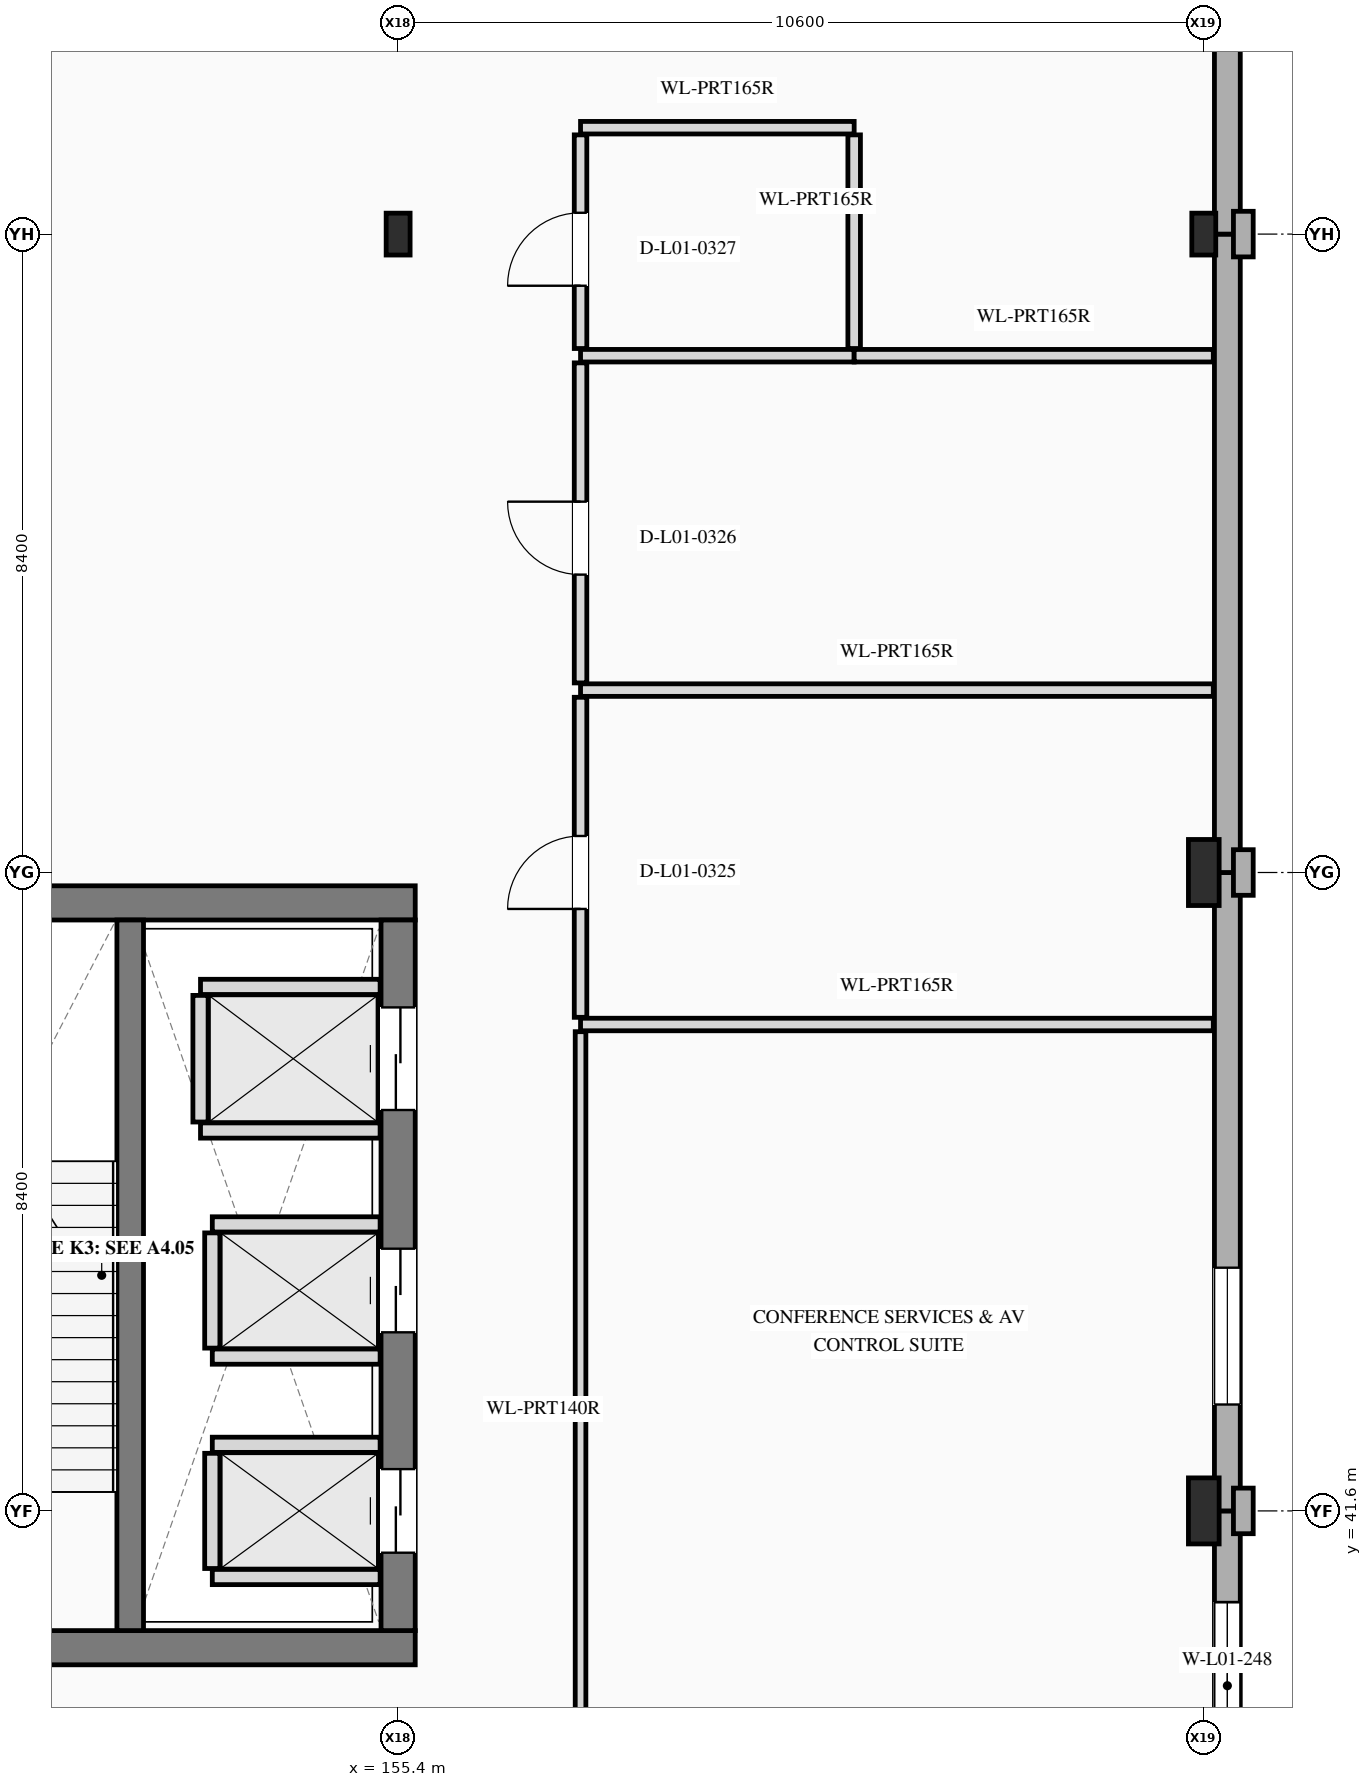
"""IFC4 building model, lengths in metres.
Left out: names, types, materials, properties, quantities, classifications, styles, units other than length and angle.
Written with IfcOpenShell. Run it as: python <this file> out.ifc"""

import sys

from ifc_helpers import new_model, si_unit, direction, frame, frame_2d, origin, origin_2d, place, context, subcontext, project, spatial, rectangle, i_section, extrude, element, fill, save


model = new_model("IFC4")
c1 = context("Model", 3, precision=1e-05, world=origin(), true_north=direction((0.0, 1.0)))
c2 = subcontext(c1, "Body", "Model", "MODEL_VIEW")
j1 = project(units=[si_unit("LENGTHUNIT", "METRE"), si_unit("PLANEANGLEUNIT", "RADIAN")], contexts=[c1])
p1 = place(None, origin())
s1 = spatial("IfcSite", under=j1, at=p1, CompositionType="ELEMENT")
p2 = place(p1, origin())
s2 = spatial("IfcBuilding", under=s1, at=p2, CompositionType="ELEMENT")
p3 = place(p2, frame((0.0, 0.0, 5.4)))
s3 = spatial("IfcBuildingStorey", under=s2, at=p3, CompositionType="ELEMENT", Elevation=5.4)
p4 = place(p3, frame((155.4, 58.4, 0.0), z_axis=(0.0, 0.0, 1.0), x_axis=(1.0, 0.0, 0.0)))
e1 = element("IfcColumn", 1, at=p4, inside=s3, PredefinedType="COLUMN", context=c2, shape_type="SweptSolid", body=[
    extrude(i_section(OverallWidth=0.315, OverallDepth=0.551, WebThickness=0.015, FlangeThickness=0.024, at=origin_2d()), origin(), (0.0, 0.0, 1.0), 5.4),
])
for number, where, z_axis, x_axis in (
    (2, (166.0, 41.6, 0.0), (0.0, 0.0, 1.0), (1.0, 0.0, 0.0)),
    (3, (166.0, 50.0, 0.0), (0.0, 0.0, 1.0), (1.0, 0.0, 0.0)),
):
    element("IfcColumn", number, at=place(p3, frame(where, z_axis=z_axis, x_axis=x_axis)), inside=s3, PredefinedType="COLUMN", context=c2, shape_type="SweptSolid", body=[
        extrude(i_section(OverallWidth=0.404, OverallDepth=0.869, WebThickness=0.021, FlangeThickness=0.036, at=origin_2d()), origin(), (0.0, 0.0, 1.0), 5.4),
    ])
p5 = place(p3, frame((166.0, 58.4, 0.0), z_axis=(0.0, 0.0, 1.0), x_axis=(1.0, 0.0, 0.0)))
e4 = element("IfcColumn", 4, at=p5, inside=s3, PredefinedType="COLUMN", context=c2, shape_type="SweptSolid", body=[
    extrude(i_section(OverallWidth=0.315, OverallDepth=0.551, WebThickness=0.015, FlangeThickness=0.024, at=origin_2d()), origin(), (0.0, 0.0, 1.0), 5.4),
])
p6 = place(p3, frame((166.31, 33.2, 0.0), z_axis=(0.0, 0.0, 1.0), x_axis=(0.0, 1.0, 0.0)))
e5 = element("IfcWall", 5, at=p6, inside=s3, PredefinedType="STANDARD", context=c2, shape_type="SweptSolid", body=[
    extrude(rectangle(XDim=8.4, YDim=0.34, at=frame_2d((4.2, 0.0))), origin(), (0.0, 0.0, 1.0), 5.4),
])
p7 = place(p6, frame((1.2, 0.0, 0.85)))
e6 = element("IfcOpeningElement", 6, at=p7, cuts=e5, PredefinedType="OPENING", context=c2, shape_type="SweptSolid", body=[
    extrude(rectangle(XDim=2.2, YDim=2.1, at=frame_2d((1.1, 1.05))), frame((0.0, 0.18, 0.0), z_axis=(0.0, -1.0, 0.0), x_axis=(1.0, 0.0, 0.0)), (0.0, 0.0, 1.0), 0.36),
])
p8 = place(p6, frame((5.0, 0.0, 0.85)))
e7 = element("IfcOpeningElement", 7, at=p8, cuts=e5, PredefinedType="OPENING", context=c2, shape_type="SweptSolid", body=[
    extrude(rectangle(XDim=2.2, YDim=2.8, at=frame_2d((1.1, 1.4))), frame((0.0, 0.18, 0.0), z_axis=(0.0, -1.0, 0.0), x_axis=(1.0, 0.0, 0.0)), (0.0, 0.0, 1.0), 0.36),
])
p9 = place(p3, frame((166.31, 41.6, 0.0), z_axis=(0.0, 0.0, 1.0), x_axis=(0.0, 1.0, 0.0)))
e8 = element("IfcWall", 8, at=p9, inside=s3, PredefinedType="STANDARD", context=c2, shape_type="SweptSolid", body=[
    extrude(rectangle(XDim=8.4, YDim=0.34, at=frame_2d((4.2, 0.0))), origin(), (0.0, 0.0, 1.0), 5.4),
])
p10 = place(p9, frame((1.4, 0.0, 0.9)))
e9 = element("IfcOpeningElement", 9, at=p10, cuts=e8, PredefinedType="OPENING", context=c2, shape_type="SweptSolid", body=[
    extrude(rectangle(XDim=1.8, YDim=1.8, at=frame_2d((0.9, 0.9))), frame((0.0, 0.18, 0.0), z_axis=(0.0, -1.0, 0.0), x_axis=(1.0, 0.0, 0.0)), (0.0, 0.0, 1.0), 0.36),
])
p11 = place(p3, frame((166.52, 41.3, 0.0), z_axis=(0.0, 0.0, 1.0), x_axis=(0.0, 1.0, 0.0)))
e10 = element("IfcWall", 10, at=p11, inside=s3, PredefinedType="ELEMENTEDWALL", context=c2, shape_type="SweptSolid", body=[
    extrude(rectangle(XDim=0.6, YDim=0.26, at=frame_2d((0.3, 0.0))), origin(), (0.0, 0.0, 1.0), 5.4),
])
p12 = place(p3, frame((166.31, 50.0, 0.0), z_axis=(0.0, 0.0, 1.0), x_axis=(0.0, 1.0, 0.0)))
e11 = element("IfcWall", 11, at=p12, inside=s3, PredefinedType="STANDARD", context=c2, shape_type="SweptSolid", body=[
    extrude(rectangle(XDim=8.4, YDim=0.34, at=frame_2d((4.2, 0.0))), origin(), (0.0, 0.0, 1.0), 5.4),
])
p13 = place(p3, frame((166.52, 49.7, 0.0), z_axis=(0.0, 0.0, 1.0), x_axis=(0.0, 1.0, 0.0)))
e12 = element("IfcWall", 12, at=p13, inside=s3, PredefinedType="ELEMENTEDWALL", context=c2, shape_type="SweptSolid", body=[
    extrude(rectangle(XDim=0.6, YDim=0.26, at=frame_2d((0.3, 0.0))), origin(), (0.0, 0.0, 1.0), 5.4),
])
p14 = place(p3, frame((166.31, 58.4, 0.0), z_axis=(0.0, 0.0, 1.0), x_axis=(0.0, 1.0, 0.0)))
e13 = element("IfcWall", 13, at=p14, inside=s3, PredefinedType="STANDARD", context=c2, shape_type="SweptSolid", body=[
    extrude(rectangle(XDim=8.71, YDim=0.34, at=frame_2d((4.355, 0.0))), origin(), (0.0, 0.0, 1.0), 5.4),
])
p15 = place(p3, frame((166.52, 58.1, 0.0), z_axis=(0.0, 0.0, 1.0), x_axis=(0.0, 1.0, 0.0)))
e14 = element("IfcWall", 14, at=p15, inside=s3, PredefinedType="ELEMENTEDWALL", context=c2, shape_type="SweptSolid", body=[
    extrude(rectangle(XDim=0.6, YDim=0.26, at=frame_2d((0.3, 0.0))), origin(), (0.0, 0.0, 1.0), 5.4),
])
p16 = place(p3, frame((147.375, 39.8, 0.0), z_axis=(0.0, 0.0, 1.0), x_axis=(1.0, 0.0, 0.0)))
e15 = element("IfcWall", 15, at=p16, inside=s3, PredefinedType="SHEAR", context=c2, shape_type="SweptSolid", body=[
    extrude(rectangle(XDim=8.25, YDim=0.45, at=frame_2d((4.125, 0.0))), origin(), (0.0, 0.0, 1.0), 5.4),
])
p17 = place(p16, frame((1.725, 0.0, 0.0)))
e16 = element("IfcOpeningElement", 16, at=p17, cuts=e15, PredefinedType="OPENING", context=c2, shape_type="SweptSolid", body=[
    extrude(rectangle(XDim=0.95, YDim=2.2, at=frame_2d((0.475, 1.1))), frame((0.0, 0.235, 0.0), z_axis=(0.0, -1.0, 0.0), x_axis=(1.0, 0.0, 0.0)), (0.0, 0.0, 1.0), 0.47),
])
p18 = place(p3, frame((155.625, 49.6, 0.0), z_axis=(0.0, 0.0, 1.0), x_axis=(-1.0, 0.0, 0.0)))
e17 = element("IfcWall", 17, at=p18, inside=s3, PredefinedType="SHEAR", context=c2, shape_type="SweptSolid", body=[
    extrude(rectangle(XDim=8.25, YDim=0.45, at=frame_2d((4.125, 0.0))), origin(), (0.0, 0.0, 1.0), 5.4),
])
p19 = place(p3, frame((155.4, 40.025, 0.0), z_axis=(0.0, 0.0, 1.0), x_axis=(0.0, 1.0, 0.0)))
e18 = element("IfcWall", 18, at=p19, inside=s3, PredefinedType="SHEAR", context=c2, shape_type="SweptSolid", body=[
    extrude(rectangle(XDim=9.35, YDim=0.45, at=frame_2d((4.675, 0.0))), origin(), (0.0, 0.0, 1.0), 5.4),
])
p20 = place(p19, frame((1.025, 0.0, 0.0)))
e19 = element("IfcOpeningElement", 19, at=p20, cuts=e18, PredefinedType="OPENING", context=c2, shape_type="SweptSolid", body=[
    extrude(rectangle(XDim=1.1, YDim=2.2, at=frame_2d((0.55, 1.1))), frame((0.0, 0.235, 0.0), z_axis=(0.0, -1.0, 0.0), x_axis=(1.0, 0.0, 0.0)), (0.0, 0.0, 1.0), 0.47),
])
p21 = place(p19, frame((3.925, 0.0, 0.0)))
e20 = element("IfcOpeningElement", 20, at=p21, cuts=e18, PredefinedType="OPENING", context=c2, shape_type="SweptSolid", body=[
    extrude(rectangle(XDim=1.1, YDim=2.2, at=frame_2d((0.55, 1.1))), frame((0.0, 0.235, 0.0), z_axis=(0.0, -1.0, 0.0), x_axis=(1.0, 0.0, 0.0)), (0.0, 0.0, 1.0), 0.47),
])
p22 = place(p19, frame((6.85, 0.0, 0.0)))
e21 = element("IfcOpeningElement", 21, at=p22, cuts=e18, PredefinedType="OPENING", context=c2, shape_type="SweptSolid", body=[
    extrude(rectangle(XDim=1.35, YDim=2.3, at=frame_2d((0.675, 1.15))), frame((0.0, 0.235, 0.0), z_axis=(0.0, -1.0, 0.0), x_axis=(1.0, 0.0, 0.0)), (0.0, 0.0, 1.0), 0.47),
])
p23 = place(p3, frame((151.875, 40.025, 0.0), z_axis=(0.0, 0.0, 1.0), x_axis=(0.0, 1.0, 0.0)))
e22 = element("IfcWall", 22, at=p23, inside=s3, PredefinedType="SHEAR", context=c2, shape_type="SweptSolid", body=[
    extrude(rectangle(XDim=9.35, YDim=0.35, at=frame_2d((4.675, 0.0))), origin(), (0.0, 0.0, 1.0), 5.4),
])
for number, where, z_axis, x_axis in (
    (23, (152.955, 40.73, 0.0), (0.0, 0.0, 1.0), (1.0, 0.0, 0.0)),
    (24, (152.955, 42.47, 0.0), (0.0, 0.0, 1.0), (1.0, 0.0, 0.0)),
):
    element("IfcWall", number, at=place(p3, frame(where, z_axis=z_axis, x_axis=x_axis)), inside=s3, PredefinedType="PLUMBINGWALL", context=c2, shape_type="SweptSolid", body=[
        extrude(rectangle(XDim=2.208, YDim=0.2, at=frame_2d((1.104, 0.0))), origin(), (0.0, 0.0, 1.0), 5.095),
    ])
p24 = place(p3, frame((152.955, 40.842, 0.0), z_axis=(0.0, 0.0, 1.0), x_axis=(0.0, 1.0, 0.0)))
e25 = element("IfcWall", 25, at=p24, inside=s3, PredefinedType="PLUMBINGWALL", context=c2, shape_type="SweptSolid", body=[
    extrude(rectangle(XDim=1.516, YDim=0.2, at=frame_2d((0.758, 0.0))), origin(), (0.0, 0.0, 1.0), 5.095),
])
for number, where, z_axis, x_axis in (
    (26, (152.955, 43.63, 0.0), (0.0, 0.0, 1.0), (1.0, 0.0, 0.0)),
    (27, (152.955, 45.37, 0.0), (0.0, 0.0, 1.0), (1.0, 0.0, 0.0)),
):
    element("IfcWall", number, at=place(p3, frame(where, z_axis=z_axis, x_axis=x_axis)), inside=s3, PredefinedType="PLUMBINGWALL", context=c2, shape_type="SweptSolid", body=[
        extrude(rectangle(XDim=2.208, YDim=0.2, at=frame_2d((1.104, 0.0))), origin(), (0.0, 0.0, 1.0), 5.095),
    ])
p25 = place(p3, frame((152.955, 43.742, 0.0), z_axis=(0.0, 0.0, 1.0), x_axis=(0.0, 1.0, 0.0)))
e28 = element("IfcWall", 28, at=p25, inside=s3, PredefinedType="PLUMBINGWALL", context=c2, shape_type="SweptSolid", body=[
    extrude(rectangle(XDim=1.516, YDim=0.2, at=frame_2d((0.758, 0.0))), origin(), (0.0, 0.0, 1.0), 5.095),
])
for number, where, z_axis, x_axis in (
    (29, (152.8, 46.605, 0.0), (0.0, 0.0, 1.0), (1.0, 0.0, 0.0)),
    (30, (152.8, 48.495, 0.0), (0.0, 0.0, 1.0), (1.0, 0.0, 0.0)),
):
    element("IfcWall", number, at=place(p3, frame(where, z_axis=z_axis, x_axis=x_axis)), inside=s3, PredefinedType="PLUMBINGWALL", context=c2, shape_type="SweptSolid", body=[
        extrude(rectangle(XDim=2.363, YDim=0.2, at=frame_2d((1.182, 0.0))), origin(), (0.0, 0.0, 1.0), 5.095),
    ])
p26 = place(p3, frame((152.8, 46.717, 0.0), z_axis=(0.0, 0.0, 1.0), x_axis=(0.0, 1.0, 0.0)))
e31 = element("IfcWall", 31, at=p26, inside=s3, PredefinedType="PLUMBINGWALL", context=c2, shape_type="SweptSolid", body=[
    extrude(rectangle(XDim=1.666, YDim=0.2, at=frame_2d((0.833, 0.0))), origin(), (0.0, 0.0, 1.0), 5.095),
])
for number, where, z_axis, x_axis in (
    (32, (157.8, 48.0, 0.0), (0.0, 0.0, 1.0), (1.0, 0.0, 0.0)),
    (33, (157.8, 52.4, 0.0), (0.0, 0.0, 1.0), (1.0, 0.0, 0.0)),
):
    element("IfcWall", number, at=place(p3, frame(where, z_axis=z_axis, x_axis=x_axis)), inside=s3, PredefinedType="PARTITIONING", context=c2, shape_type="SweptSolid", body=[
        extrude(rectangle(XDim=8.325, YDim=0.165, at=frame_2d((4.163, 0.0))), origin(), (0.0, 0.0, 1.0), 4.485),
    ])
p27 = place(p3, frame((157.8, 56.8, 0.0), z_axis=(0.0, 0.0, 1.0), x_axis=(1.0, 0.0, 0.0)))
e34 = element("IfcWall", 34, at=p27, inside=s3, PredefinedType="PARTITIONING", context=c2, shape_type="SweptSolid", body=[
    extrude(rectangle(XDim=3.6, YDim=0.165, at=frame_2d((1.8, 0.0))), origin(), (0.0, 0.0, 1.0), 5.095),
])
p28 = place(p3, frame((161.4, 56.8, 0.0), z_axis=(0.0, 0.0, 1.0), x_axis=(1.0, 0.0, 0.0)))
e35 = element("IfcWall", 35, at=p28, inside=s3, PredefinedType="PARTITIONING", context=c2, shape_type="SweptSolid", body=[
    extrude(rectangle(XDim=4.725, YDim=0.165, at=frame_2d((2.363, 0.0))), origin(), (0.0, 0.0, 1.0), 4.485),
])
p29 = place(p3, frame((157.8, 59.8, 0.0), z_axis=(0.0, 0.0, 1.0), x_axis=(1.0, 0.0, 0.0)))
e36 = element("IfcWall", 36, at=p29, inside=s3, PredefinedType="PARTITIONING", context=c2, shape_type="SweptSolid", body=[
    extrude(rectangle(XDim=3.6, YDim=0.165, at=frame_2d((1.8, 0.0))), origin(), (0.0, 0.0, 1.0), 5.095),
])
p30 = place(p3, frame((157.8, 19.082, 0.0), z_axis=(0.0, 0.0, 1.0), x_axis=(0.0, 1.0, 0.0)))
e37 = element("IfcWall", 37, at=p30, inside=s3, PredefinedType="PARTITIONING", context=c2, shape_type="SweptSolid", body=[
    extrude(rectangle(XDim=28.823, YDim=0.14, at=frame_2d((14.412, 0.0))), origin(), (0.0, 0.0, 1.0), 4.508),
])
p31 = place(p30, frame((10.118, 0.0, 0.0)))
e38 = element("IfcOpeningElement", 38, at=p31, cuts=e37, PredefinedType="OPENING", context=c2, shape_type="SweptSolid", body=[
    extrude(rectangle(XDim=1.6, YDim=2.4, at=frame_2d((0.8, 1.2))), frame((0.0, 0.08, 0.0), z_axis=(0.0, -1.0, 0.0), x_axis=(1.0, 0.0, 0.0)), (0.0, 0.0, 1.0), 0.16),
])
p32 = place(p3, frame((157.8, 48.094, 0.0), z_axis=(0.0, 0.0, 1.0), x_axis=(0.0, 1.0, 0.0)))
e39 = element("IfcWall", 39, at=p32, inside=s3, PredefinedType="PARTITIONING", context=c2, shape_type="SweptSolid", body=[
    extrude(rectangle(XDim=4.211, YDim=0.165, at=frame_2d((2.105, 0.0))), origin(), (0.0, 0.0, 1.0), 5.095),
])
p33 = place(p32, frame((1.426, 0.0, 0.0)))
e40 = element("IfcOpeningElement", 40, at=p33, cuts=e39, PredefinedType="OPENING", context=c2, shape_type="SweptSolid", body=[
    extrude(rectangle(XDim=0.96, YDim=2.15, at=frame_2d((0.48, 1.075))), frame((0.0, 0.093, 0.0), z_axis=(0.0, -1.0, 0.0), x_axis=(1.0, 0.0, 0.0)), (0.0, 0.0, 1.0), 0.185),
])
p34 = place(p3, frame((157.8, 52.494, 0.0), z_axis=(0.0, 0.0, 1.0), x_axis=(0.0, 1.0, 0.0)))
e41 = element("IfcWall", 41, at=p34, inside=s3, PredefinedType="PARTITIONING", context=c2, shape_type="SweptSolid", body=[
    extrude(rectangle(XDim=4.211, YDim=0.165, at=frame_2d((2.105, 0.0))), origin(), (0.0, 0.0, 1.0), 5.095),
])
p35 = place(p34, frame((1.425, 0.0, 0.0)))
e42 = element("IfcOpeningElement", 42, at=p35, cuts=e41, PredefinedType="OPENING", context=c2, shape_type="SweptSolid", body=[
    extrude(rectangle(XDim=0.96, YDim=2.15, at=frame_2d((0.48, 1.075))), frame((0.0, 0.093, 0.0), z_axis=(0.0, -1.0, 0.0), x_axis=(1.0, 0.0, 0.0)), (0.0, 0.0, 1.0), 0.185),
])
p36 = place(p3, frame((157.8, 56.895, 0.0), z_axis=(0.0, 0.0, 1.0), x_axis=(0.0, 1.0, 0.0)))
e43 = element("IfcWall", 43, at=p36, inside=s3, PredefinedType="PARTITIONING", context=c2, shape_type="SweptSolid", body=[
    extrude(rectangle(XDim=2.811, YDim=0.165, at=frame_2d((1.406, 0.0))), origin(), (0.0, 0.0, 1.0), 4.508),
])
p37 = place(p36, frame((0.826, 0.0, 0.0)))
e44 = element("IfcOpeningElement", 44, at=p37, cuts=e43, PredefinedType="OPENING", context=c2, shape_type="SweptSolid", body=[
    extrude(rectangle(XDim=0.96, YDim=2.15, at=frame_2d((0.48, 1.075))), frame((0.0, 0.093, 0.0), z_axis=(0.0, -1.0, 0.0), x_axis=(1.0, 0.0, 0.0)), (0.0, 0.0, 1.0), 0.185),
])
p38 = place(p3, frame((161.4, 56.895, 0.0), z_axis=(0.0, 0.0, 1.0), x_axis=(0.0, 1.0, 0.0)))
e45 = element("IfcWall", 45, at=p38, inside=s3, PredefinedType="PARTITIONING", context=c2, shape_type="SweptSolid", body=[
    extrude(rectangle(XDim=2.811, YDim=0.165, at=frame_2d((1.406, 0.0))), origin(), (0.0, 0.0, 1.0), 4.508),
])
p39 = place(p8, origin())
e46 = element("IfcWindow", 46, at=p39, inside=s3, PartitioningType="SINGLE_PANEL", PredefinedType="WINDOW", context=c2, shape_type="SweptSolid", body=[
    extrude(rectangle(XDim=2.2, YDim=2.8, at=frame_2d((1.1, 1.4))), frame((0.0, 0.03, 0.0), z_axis=(0.0, -1.0, 0.0), x_axis=(1.0, 0.0, 0.0)), (0.0, 0.0, 1.0), 0.06),
])
fill(e7, e46)
p40 = place(p10, origin())
e47 = element("IfcWindow", 47, at=p40, inside=s3, PartitioningType="SINGLE_PANEL", PredefinedType="WINDOW", context=c2, shape_type="SweptSolid", body=[
    extrude(rectangle(XDim=1.8, YDim=1.8, at=frame_2d((0.9, 0.9))), frame((0.0, 0.03, 0.0), z_axis=(0.0, -1.0, 0.0), x_axis=(1.0, 0.0, 0.0)), (0.0, 0.0, 1.0), 0.06),
])
fill(e9, e47)
p41 = place(p20, origin())
e48 = element("IfcDoor", 48, at=p41, inside=s3, OperationType="SLIDING_TO_LEFT", PredefinedType="DOOR", context=c2, shape_type="SweptSolid", body=[
    extrude(rectangle(XDim=1.1, YDim=2.2, at=frame_2d((0.55, 1.1))), frame((0.0, 0.025, 0.0), z_axis=(0.0, -1.0, 0.0), x_axis=(1.0, 0.0, 0.0)), (0.0, 0.0, 1.0), 0.05),
])
fill(e19, e48)
p42 = place(p21, origin())
e49 = element("IfcDoor", 49, at=p42, inside=s3, OperationType="SLIDING_TO_RIGHT", PredefinedType="DOOR", context=c2, shape_type="SweptSolid", body=[
    extrude(rectangle(XDim=1.1, YDim=2.2, at=frame_2d((0.55, 1.1))), frame((0.0, 0.025, 0.0), z_axis=(0.0, -1.0, 0.0), x_axis=(1.0, 0.0, 0.0)), (0.0, 0.0, 1.0), 0.05),
])
fill(e20, e49)
p43 = place(p22, origin())
e50 = element("IfcDoor", 50, at=p43, inside=s3, OperationType="SLIDING_TO_LEFT", PredefinedType="DOOR", context=c2, shape_type="SweptSolid", body=[
    extrude(rectangle(XDim=1.35, YDim=2.3, at=frame_2d((0.675, 1.15))), frame((0.0, 0.025, 0.0), z_axis=(0.0, -1.0, 0.0), x_axis=(1.0, 0.0, 0.0)), (0.0, 0.0, 1.0), 0.05),
])
fill(e21, e50)
p44 = place(p33, origin())
e51 = element("IfcDoor", 51, at=p44, inside=s3, OperationType="SINGLE_SWING_LEFT", PredefinedType="DOOR", context=c2, shape_type="SweptSolid", body=[
    extrude(rectangle(XDim=0.96, YDim=2.15, at=frame_2d((0.48, 1.075))), frame((0.0, 0.025, 0.0), z_axis=(0.0, -1.0, 0.0), x_axis=(1.0, 0.0, 0.0)), (0.0, 0.0, 1.0), 0.05),
])
fill(e40, e51)
p45 = place(p35, origin())
e52 = element("IfcDoor", 52, at=p45, inside=s3, OperationType="SINGLE_SWING_RIGHT", PredefinedType="DOOR", context=c2, shape_type="SweptSolid", body=[
    extrude(rectangle(XDim=0.96, YDim=2.15, at=frame_2d((0.48, 1.075))), frame((0.0, 0.025, 0.0), z_axis=(0.0, -1.0, 0.0), x_axis=(1.0, 0.0, 0.0)), (0.0, 0.0, 1.0), 0.05),
])
fill(e42, e52)
p46 = place(p37, origin())
e53 = element("IfcDoor", 53, at=p46, inside=s3, OperationType="SINGLE_SWING_LEFT", PredefinedType="DOOR", context=c2, shape_type="SweptSolid", body=[
    extrude(rectangle(XDim=0.96, YDim=2.15, at=frame_2d((0.48, 1.075))), frame((0.0, 0.025, 0.0), z_axis=(0.0, -1.0, 0.0), x_axis=(1.0, 0.0, 0.0)), (0.0, 0.0, 1.0), 0.05),
])
fill(e44, e53)
save(model, sys.argv[1])
